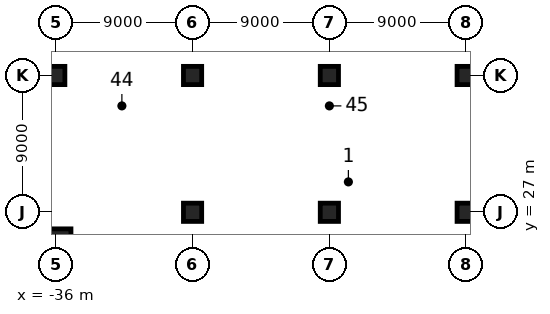
"""IFC4 building model, lengths in metres.
Left out: names, types, materials, properties, quantities, classifications, styles, units other than length and angle.
Written with IfcOpenShell. Run it as: python <this file> out.ifc"""

import sys

from ifc_helpers import new_model, si_unit, direction, frame, origin, origin_2d, place, context, subcontext, project, spatial, rectangle, extrude, element, save


model = new_model("IFC4")
c1 = context("Model", 3, precision=1e-05, world=origin(), true_north=direction((0.0, 1.0)))
c2 = subcontext(c1, "Body", "Model", "MODEL_VIEW")
j1 = project(units=[si_unit("LENGTHUNIT", "METRE"), si_unit("PLANEANGLEUNIT", "RADIAN")], contexts=[c1])
p1 = place(None, origin())
s1 = spatial("IfcSite", under=j1, at=p1, CompositionType="ELEMENT")
p2 = place(p1, origin())
s2 = spatial("IfcBuilding", under=s1, at=p2, CompositionType="ELEMENT")
p3 = place(p2, frame((0.0, 0.0, -4.5)))
s3 = spatial("IfcBuildingStorey", under=s2, at=p3, CompositionType="ELEMENT", Elevation=-4.5)
for number, where, z_axis, x_axis in (
    (1, (-36.0, 36.0, 0.0), (0.0, 0.0, 1.0), (1.0, 0.0, 0.0)),
    (2, (-27.0, 27.0, 0.0), (0.0, 0.0, 1.0), (1.0, 0.0, 0.0)),
    (3, (-27.0, 36.0, 0.0), (0.0, 0.0, 1.0), (1.0, 0.0, 0.0)),
    (4, (-18.0, 27.0, 0.0), (0.0, 0.0, 1.0), (1.0, 0.0, 0.0)),
    (5, (-18.0, 36.0, 0.0), (0.0, 0.0, 1.0), (1.0, 0.0, 0.0)),
    (6, (-9.0, 27.0, 0.0), (0.0, 0.0, 1.0), (1.0, 0.0, 0.0)),
    (7, (-9.0, 36.0, 0.0), (0.0, 0.0, 1.0), (1.0, 0.0, 0.0)),
):
    element("IfcColumn", number, at=place(p3, frame(where, z_axis=z_axis, x_axis=x_axis)), inside=s3, PredefinedType="COLUMN", context=c2, shape_type="SweptSolid", body=[
        extrude(rectangle(XDim=1.2, YDim=1.2, at=origin_2d()), origin(), (0.0, 0.0, 1.0), 4.5),
    ])
p4 = place(p3, frame((-36.0, 24.91, 0.0), z_axis=(0.0, 0.0, 1.0), x_axis=(0.0, 1.0, 0.0)))
e8 = element("IfcColumn", 8, at=p4, inside=s3, PredefinedType="COLUMN", context=c2, shape_type="SweptSolid", body=[
    extrude(rectangle(XDim=2.0, YDim=2.0, at=origin_2d()), origin(), (0.0, 0.0, 1.0), 4.5),
])
save(model, sys.argv[1])
